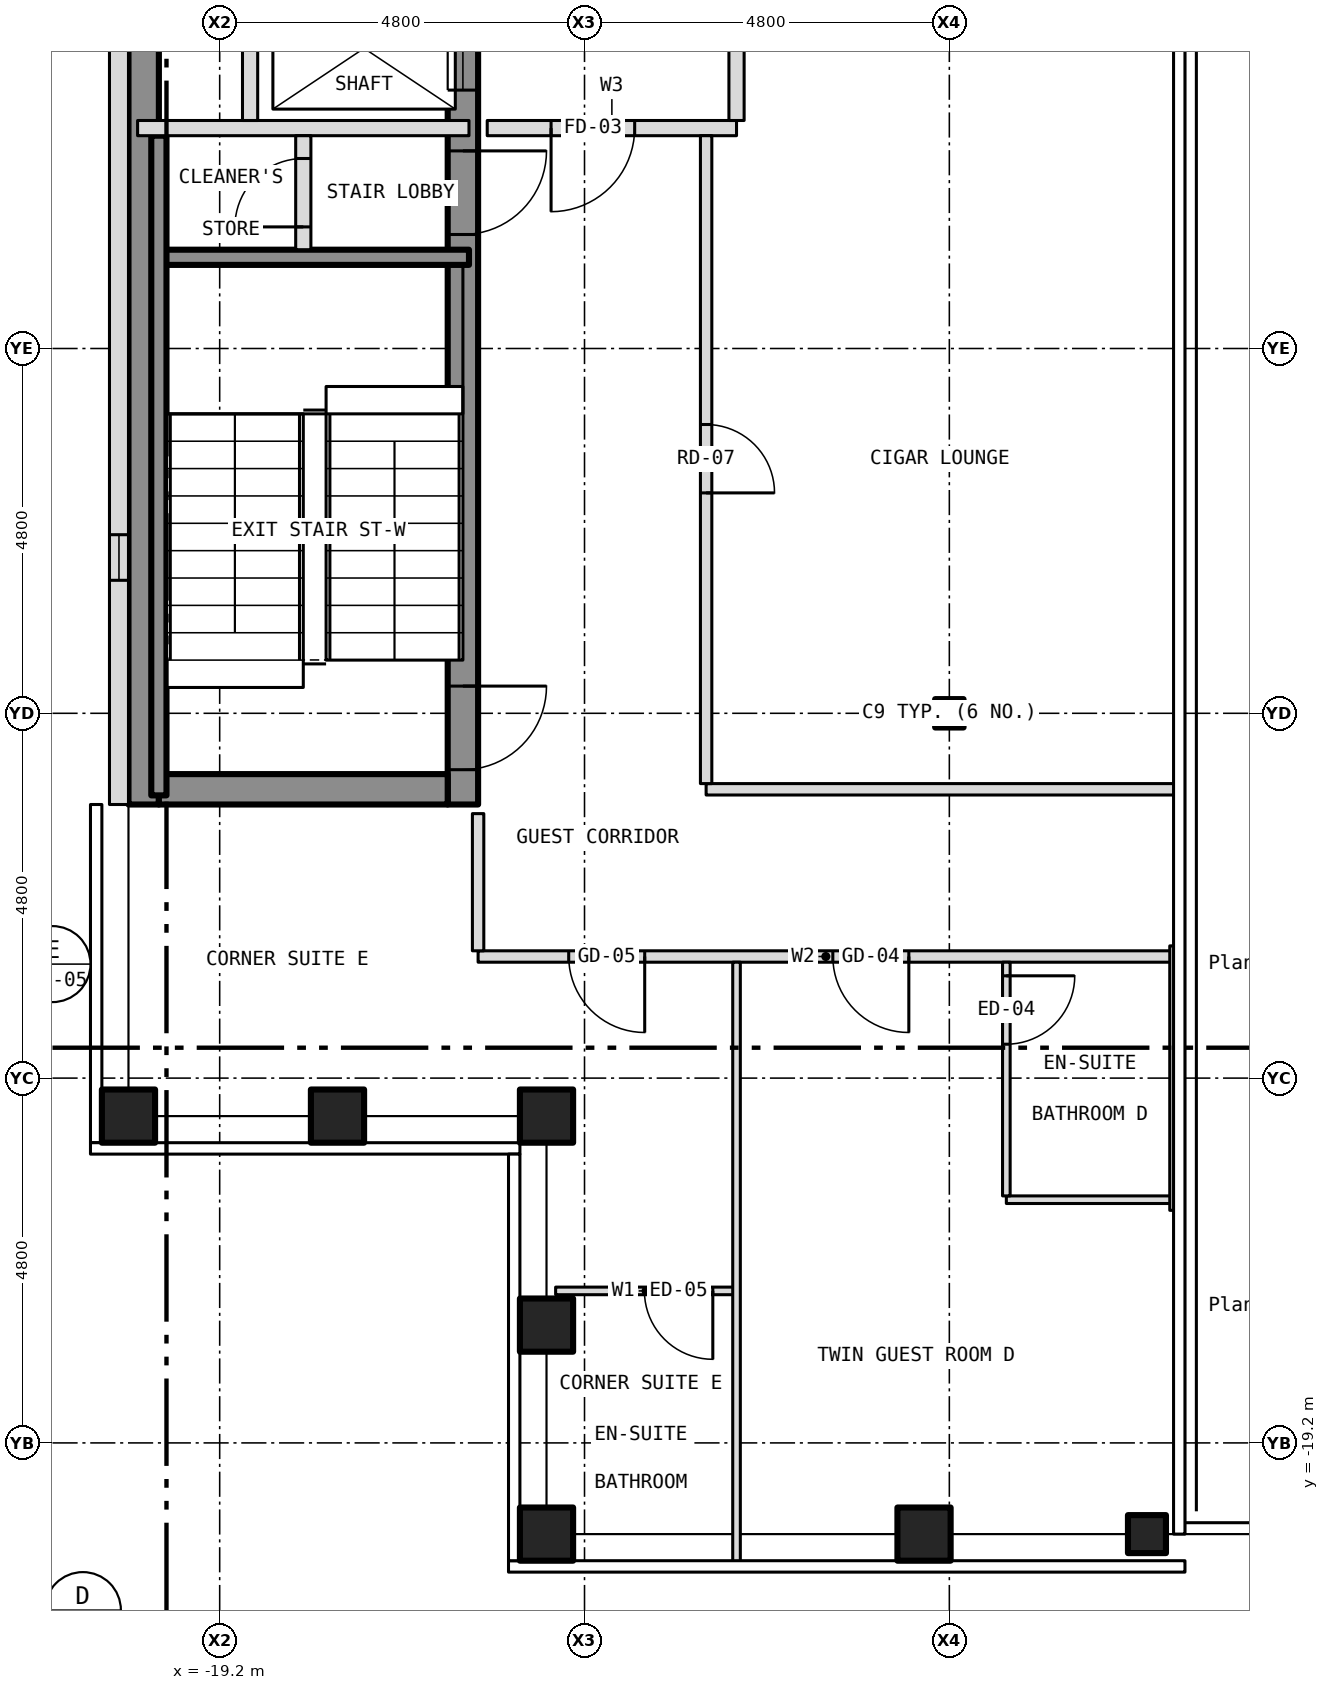
"""IFC4 building model, lengths in metres.
Left out: names, types, materials, properties, quantities, classifications, styles, units other than length and angle.
Written with IfcOpenShell. Run it as: python <this file> out.ifc"""

import sys

from ifc_helpers import new_model, si_unit, direction, frame, frame_2d, origin, origin_2d, place, context, subcontext, project, spatial, rectangle, hollow_rectangle, i_section, extrude, element, fill, save


model = new_model("IFC4")
c1 = context("Model", 3, precision=1e-05, world=origin(), true_north=direction((0.0, 1.0)))
c2 = subcontext(c1, "Body", "Model", "MODEL_VIEW")
j1 = project(units=[si_unit("LENGTHUNIT", "METRE"), si_unit("PLANEANGLEUNIT", "RADIAN")], contexts=[c1])
p1 = place(None, origin())
s1 = spatial("IfcSite", under=j1, at=p1, CompositionType="ELEMENT")
p2 = place(p1, origin())
s2 = spatial("IfcBuilding", under=s1, at=p2, CompositionType="ELEMENT")
p3 = place(p2, frame((0.0, 0.0, 219.0)))
s3 = spatial("IfcBuildingStorey", under=s2, at=p3, CompositionType="ELEMENT", Elevation=219.0)
for number, where, z_axis, x_axis in (
    (1, (-14.9, -20.4, -0.15), (0.0, 0.0, 1.0), (1.0, 0.0, 0.0)),
    (2, (-9.933, -20.4, -0.15), (0.0, 0.0, 1.0), (1.0, 0.0, 0.0)),
    (3, (-20.4, -14.9, -0.15), (0.0, 0.0, 1.0), (1.0, 0.0, 0.0)),
    (4, (-14.9, -14.9, -0.15), (0.0, 0.0, 1.0), (1.0, 0.0, 0.0)),
    (5, (-14.9, -17.65, -0.15), (0.0, 0.0, 1.0), (1.0, 0.0, 0.0)),
    (6, (-17.65, -14.9, -0.15), (0.0, 0.0, 1.0), (1.0, 0.0, 0.0)),
):
    element("IfcColumn", number, at=place(p3, frame(where, z_axis=z_axis, x_axis=x_axis)), inside=s3, PredefinedType="COLUMN", context=c2, shape_type="SweptSolid", body=[
        extrude(hollow_rectangle(XDim=0.7, YDim=0.7, WallThickness=0.04, at=origin_2d()), origin(), (0.0, 0.0, 1.0), 3.5),
    ])
p4 = place(p3, frame((-7.0, -20.4, -0.15), z_axis=(0.0, 0.0, 1.0), x_axis=(1.0, 0.0, 0.0)))
e7 = element("IfcColumn", 7, at=p4, inside=s3, PredefinedType="COLUMN", context=c2, shape_type="SweptSolid", body=[
    extrude(hollow_rectangle(XDim=0.5, YDim=0.5, WallThickness=0.03, at=origin_2d()), origin(), (0.0, 0.0, 1.0), 3.5),
])
p5 = place(p3, frame((-9.6, -9.6, -0.15), z_axis=(0.0, 0.0, 1.0), x_axis=(1.0, 0.0, 0.0)))
e8 = element("IfcColumn", 8, at=p5, inside=s3, PredefinedType="COLUMN", context=c2, shape_type="SweptSolid", body=[
    extrude(i_section(OverallWidth=0.373, OverallDepth=0.373, WebThickness=0.016, FlangeThickness=0.026, at=origin_2d()), origin(), (0.0, 0.0, 1.0), 3.5),
])
p6 = place(p3, frame((-16.0, -10.8, 0.0), z_axis=(0.0, 0.0, 1.0), x_axis=(0.0, 1.0, 0.0)))
e9 = element("IfcWall", 9, at=p6, inside=s3, PredefinedType="SHEAR", context=c2, shape_type="SweptSolid", body=[
    extrude(rectangle(XDim=21.6, YDim=0.4, at=frame_2d((10.8, 0.0))), origin(), (0.0, 0.0, 1.0), 3.25),
])
p7 = place(p6, frame((9.4, 0.0, 0.0)))
e10 = element("IfcOpeningElement", 10, at=p7, cuts=e9, PredefinedType="OPENING", context=c2, shape_type="SweptSolid", body=[
    extrude(rectangle(XDim=1.1, YDim=2.1, at=frame_2d((0.55, 1.05))), frame((0.0, 0.212, 0.0), z_axis=(0.0, -1.0, 0.0), x_axis=(1.0, 0.0, 0.0)), (0.0, 0.0, 1.0), 0.424),
])
p8 = place(p6, frame((11.5, 0.0, 0.0)))
e11 = element("IfcOpeningElement", 11, at=p8, cuts=e9, PredefinedType="OPENING", context=c2, shape_type="SweptSolid", body=[
    extrude(rectangle(XDim=1.1, YDim=2.1, at=frame_2d((0.55, 1.05))), frame((0.0, 0.212, 0.0), z_axis=(0.0, -1.0, 0.0), x_axis=(1.0, 0.0, 0.0)), (0.0, 0.0, 1.0), 0.424),
])
p9 = place(p6, frame((13.6, 0.0, 0.0)))
e12 = element("IfcOpeningElement", 12, at=p9, cuts=e9, PredefinedType="OPENING", context=c2, shape_type="SweptSolid", body=[
    extrude(rectangle(XDim=1.1, YDim=2.1, at=frame_2d((0.55, 1.05))), frame((0.0, 0.212, 0.0), z_axis=(0.0, -1.0, 0.0), x_axis=(1.0, 0.0, 0.0)), (0.0, 0.0, 1.0), 0.424),
])
p10 = place(p6, frame((15.7, 0.0, 0.0)))
e13 = element("IfcOpeningElement", 13, at=p10, cuts=e9, PredefinedType="OPENING", context=c2, shape_type="SweptSolid", body=[
    extrude(rectangle(XDim=1.1, YDim=2.1, at=frame_2d((0.55, 1.05))), frame((0.0, 0.212, 0.0), z_axis=(0.0, -1.0, 0.0), x_axis=(1.0, 0.0, 0.0)), (0.0, 0.0, 1.0), 0.424),
])
p11 = place(p6, frame((17.8, 0.0, 0.0)))
e14 = element("IfcOpeningElement", 14, at=p11, cuts=e9, PredefinedType="OPENING", context=c2, shape_type="SweptSolid", body=[
    extrude(rectangle(XDim=1.1, YDim=2.1, at=frame_2d((0.55, 1.05))), frame((0.0, 0.212, 0.0), z_axis=(0.0, -1.0, 0.0), x_axis=(1.0, 0.0, 0.0)), (0.0, 0.0, 1.0), 0.424),
])
p12 = place(p6, frame((0.458, 0.0, 0.0)))
e15 = element("IfcOpeningElement", 15, at=p12, cuts=e9, PredefinedType="OPENING", context=c2, shape_type="SweptSolid", body=[
    extrude(rectangle(XDim=1.1, YDim=2.1, at=frame_2d((0.55, 1.05))), frame((0.0, 0.212, 0.0), z_axis=(0.0, -1.0, 0.0), x_axis=(1.0, 0.0, 0.0)), (0.0, 0.0, 1.0), 0.424),
])
p13 = place(p6, frame((7.5, 0.0, 0.0)))
e16 = element("IfcOpeningElement", 16, at=p13, cuts=e9, PredefinedType="OPENING", context=c2, shape_type="SweptSolid", body=[
    extrude(rectangle(XDim=1.1, YDim=2.1, at=frame_2d((0.55, 1.05))), frame((0.0, 0.212, 0.0), z_axis=(0.0, -1.0, 0.0), x_axis=(1.0, 0.0, 0.0)), (0.0, 0.0, 1.0), 0.424),
])
p14 = place(p6, frame((20.0, 0.0, 0.0)))
e17 = element("IfcOpeningElement", 17, at=p14, cuts=e9, PredefinedType="OPENING", context=c2, shape_type="SweptSolid", body=[
    extrude(rectangle(XDim=0.9, YDim=2.1, at=frame_2d((0.45, 1.05))), frame((0.0, 0.212, 0.0), z_axis=(0.0, -1.0, 0.0), x_axis=(1.0, 0.0, 0.0)), (0.0, 0.0, 1.0), 0.424),
])
p15 = place(p3, frame((-20.2, -10.8, 0.0), z_axis=(0.0, 0.0, 1.0), x_axis=(0.0, 1.0, 0.0)))
e18 = element("IfcWall", 18, at=p15, inside=s3, PredefinedType="SHEAR", context=c2, shape_type="SweptSolid", body=[
    extrude(rectangle(XDim=21.6, YDim=0.4, at=frame_2d((10.8, 0.0))), origin(), (0.0, 0.0, 1.0), 3.25),
])
p16 = place(p3, frame((-20.0, -10.6, 0.0), z_axis=(0.0, 0.0, 1.0), x_axis=(1.0, 0.0, 0.0)))
e19 = element("IfcWall", 19, at=p16, inside=s3, PredefinedType="SHEAR", context=c2, shape_type="SweptSolid", body=[
    extrude(rectangle(XDim=3.8, YDim=0.4, at=frame_2d((1.9, 0.0))), origin(), (0.0, 0.0, 1.0), 3.25),
])
p17 = place(p3, frame((-20.525, 10.8, 0.0), z_axis=(0.0, 0.0, 1.0), x_axis=(0.0, -1.0, 0.0)))
e20 = element("IfcWall", 20, at=p17, inside=s3, PredefinedType="SOLIDWALL", context=c2, shape_type="SweptSolid", body=[
    extrude(rectangle(XDim=21.6, YDim=0.25, at=frame_2d((10.8, 0.0))), origin(), (0.0, 0.0, 1.0), 3.5),
])
p18 = place(p17, frame((18.05, 0.0, 1.0)))
e21 = element("IfcOpeningElement", 21, at=p18, cuts=e20, PredefinedType="OPENING", context=c2, shape_type="SweptSolid", body=[
    extrude(rectangle(XDim=0.6, YDim=1.5, at=frame_2d((0.3, 0.75))), frame((0.0, 0.137, 0.0), z_axis=(0.0, -1.0, 0.0), x_axis=(1.0, 0.0, 0.0)), (0.0, 0.0, 1.0), 0.274),
])
p19 = place(p3, frame((-14.78, -17.2, 0.0), z_axis=(0.0, 0.0, 1.0), x_axis=(1.0, 0.0, 0.0)))
e22 = element("IfcWall", 22, at=p19, inside=s3, PredefinedType="PARTITIONING", context=c2, shape_type="SweptSolid", body=[
    extrude(rectangle(XDim=2.38, YDim=0.1, at=frame_2d((1.19, 0.0))), origin(), (0.0, 0.0, 1.0), 3.35),
])
p20 = place(p19, frame((1.168, 0.0, 0.0)))
e23 = element("IfcOpeningElement", 23, at=p20, cuts=e22, PredefinedType="OPENING", context=c2, shape_type="SweptSolid", body=[
    extrude(rectangle(XDim=0.9, YDim=2.1, at=frame_2d((0.45, 1.05))), frame((0.0, 0.062, 0.0), z_axis=(0.0, -1.0, 0.0), x_axis=(1.0, 0.0, 0.0)), (0.0, 0.0, 1.0), 0.124),
])
p21 = place(p3, frame((-8.85, -16.0, 0.0), z_axis=(0.0, 0.0, 1.0), x_axis=(1.0, 0.0, 0.0)))
e24 = element("IfcWall", 24, at=p21, inside=s3, PredefinedType="PARTITIONING", context=c2, shape_type="SweptSolid", body=[
    extrude(rectangle(XDim=2.2, YDim=0.1, at=frame_2d((1.1, 0.0))), origin(), (0.0, 0.0, 1.0), 3.35),
])
p22 = place(p3, frame((-15.8, -12.8, 0.0), z_axis=(0.0, 0.0, 1.0), x_axis=(1.0, 0.0, 0.0)))
e25 = element("IfcWall", 25, at=p22, inside=s3, PredefinedType="PARTITIONING", context=c2, shape_type="SweptSolid", body=[
    extrude(rectangle(XDim=9.15, YDim=0.15, at=frame_2d((4.575, 0.0))), origin(), (0.0, 0.0, 1.0), 3.35),
])
p23 = place(p22, frame((4.667, 0.0, 0.0)))
e26 = element("IfcOpeningElement", 26, at=p23, cuts=e25, PredefinedType="OPENING", context=c2, shape_type="SweptSolid", body=[
    extrude(rectangle(XDim=1.0, YDim=2.1, at=frame_2d((0.5, 1.05))), frame((0.0, 0.087, 0.0), z_axis=(0.0, -1.0, 0.0), x_axis=(1.0, 0.0, 0.0)), (0.0, 0.0, 1.0), 0.174),
])
p24 = place(p22, frame((1.192, 0.0, 0.0)))
e27 = element("IfcOpeningElement", 27, at=p24, cuts=e25, PredefinedType="OPENING", context=c2, shape_type="SweptSolid", body=[
    extrude(rectangle(XDim=1.0, YDim=2.1, at=frame_2d((0.5, 1.05))), frame((0.0, 0.087, 0.0), z_axis=(0.0, -1.0, 0.0), x_axis=(1.0, 0.0, 0.0)), (0.0, 0.0, 1.0), 0.174),
])
p25 = place(p3, frame((-12.8, -10.6, 0.0), z_axis=(0.0, 0.0, 1.0), x_axis=(1.0, 0.0, 0.0)))
e28 = element("IfcWall", 28, at=p25, inside=s3, PredefinedType="PARTITIONING", context=c2, shape_type="SweptSolid", body=[
    extrude(rectangle(XDim=6.18, YDim=0.15, at=frame_2d((3.09, 0.0))), origin(), (0.0, 0.0, 1.0), 3.35),
])
p26 = place(p3, frame((-20.0, -3.6, 0.0), z_axis=(0.0, 0.0, 1.0), x_axis=(1.0, 0.0, 0.0)))
e29 = element("IfcWall", 29, at=p26, inside=s3, PredefinedType="SHEAR", context=c2, shape_type="SweptSolid", body=[
    extrude(rectangle(XDim=4.08, YDim=0.2, at=frame_2d((2.04, 0.0))), origin(), (0.0, 0.0, 1.0), 3.25),
])
p27 = place(p3, frame((-20.28, -1.9, 0.0), z_axis=(0.0, 0.0, 1.0), x_axis=(1.0, 0.0, 0.0)))
e30 = element("IfcWall", 30, at=p27, inside=s3, PredefinedType="PARTITIONING", context=c2, shape_type="SweptSolid", body=[
    extrude(rectangle(XDim=4.36, YDim=0.2, at=frame_2d((2.18, 0.0))), origin(), (0.0, 0.0, 1.0), 3.25),
])
p28 = place(p3, frame((-15.68, -1.9, 0.0), z_axis=(0.0, 0.0, 1.0), x_axis=(1.0, 0.0, 0.0)))
e31 = element("IfcWall", 31, at=p28, inside=s3, PredefinedType="PARTITIONING", context=c2, shape_type="SweptSolid", body=[
    extrude(rectangle(XDim=3.28, YDim=0.2, at=frame_2d((1.64, 0.0))), origin(), (0.0, 0.0, 1.0), 3.35),
])
p29 = place(p28, frame((0.84, 0.0, 0.0)))
e32 = element("IfcOpeningElement", 32, at=p29, cuts=e31, PredefinedType="OPENING", context=c2, shape_type="SweptSolid", body=[
    extrude(rectangle(XDim=1.1, YDim=2.1, at=frame_2d((0.55, 1.05))), frame((0.0, 0.112, 0.0), z_axis=(0.0, -1.0, 0.0), x_axis=(1.0, 0.0, 0.0)), (0.0, 0.0, 1.0), 0.224),
])
p30 = place(p3, frame((-20.0, -10.68, 0.0), z_axis=(0.0, 0.0, 1.0), x_axis=(0.0, 1.0, 0.0)))
e33 = element("IfcWall", 33, at=p30, inside=s3, PredefinedType="SHEAR", context=c2, shape_type="SweptSolid", body=[
    extrude(rectangle(XDim=8.68, YDim=0.2, at=frame_2d((4.34, 0.0))), origin(), (0.0, 0.0, 1.0), 3.25),
])
p31 = place(p3, frame((-18.8, -1.8, 0.0), z_axis=(0.0, 0.0, 1.0), x_axis=(0.0, 1.0, 0.0)))
e34 = element("IfcWall", 34, at=p31, inside=s3, PredefinedType="PARTITIONING", context=c2, shape_type="SweptSolid", body=[
    extrude(rectangle(XDim=12.48, YDim=0.2, at=frame_2d((6.24, 0.0))), origin(), (0.0, 0.0, 1.0), 3.25),
])
p32 = place(p3, frame((-18.1, -3.5, 0.0), z_axis=(0.0, 0.0, 1.0), x_axis=(0.0, 1.0, 0.0)))
e35 = element("IfcWall", 35, at=p32, inside=s3, PredefinedType="PARTITIONING", context=c2, shape_type="SweptSolid", body=[
    extrude(rectangle(XDim=1.5, YDim=0.2, at=frame_2d((0.75, 0.0))), origin(), (0.0, 0.0, 1.0), 3.25),
])
p33 = place(p32, frame((0.3, 0.0, 0.0)))
e36 = element("IfcOpeningElement", 36, at=p33, cuts=e35, PredefinedType="OPENING", context=c2, shape_type="SweptSolid", body=[
    extrude(rectangle(XDim=0.9, YDim=2.1, at=frame_2d((0.45, 1.05))), frame((0.0, 0.112, 0.0), z_axis=(0.0, -1.0, 0.0), x_axis=(1.0, 0.0, 0.0)), (0.0, 0.0, 1.0), 0.224),
])
p34 = place(p3, frame((-15.8, -12.725, 0.0), z_axis=(0.0, 0.0, 1.0), x_axis=(0.0, 1.0, 0.0)))
e37 = element("IfcWall", 37, at=p34, inside=s3, PredefinedType="PARTITIONING", context=c2, shape_type="SweptSolid", body=[
    extrude(rectangle(XDim=1.805, YDim=0.15, at=frame_2d((0.903, 0.0))), origin(), (0.0, 0.0, 1.0), 3.35),
])
p35 = place(p3, frame((-12.8, -10.525, 0.0), z_axis=(0.0, 0.0, 1.0), x_axis=(0.0, 1.0, 0.0)))
e38 = element("IfcWall", 38, at=p35, inside=s3, PredefinedType="PARTITIONING", context=c2, shape_type="SweptSolid", body=[
    extrude(rectangle(XDim=8.525, YDim=0.15, at=frame_2d((4.262, 0.0))), origin(), (0.0, 0.0, 1.0), 3.35),
])
p36 = place(p35, frame((3.825, 0.0, 0.0)))
e39 = element("IfcOpeningElement", 39, at=p36, cuts=e38, PredefinedType="OPENING", context=c2, shape_type="SweptSolid", body=[
    extrude(rectangle(XDim=0.9, YDim=2.1, at=frame_2d((0.45, 1.05))), frame((0.0, 0.087, 0.0), z_axis=(0.0, -1.0, 0.0), x_axis=(1.0, 0.0, 0.0)), (0.0, 0.0, 1.0), 0.174),
])
p37 = place(p3, frame((-12.4, -20.78, 0.0), z_axis=(0.0, 0.0, 1.0), x_axis=(0.0, 1.0, 0.0)))
e40 = element("IfcWall", 40, at=p37, inside=s3, PredefinedType="PARTITIONING", context=c2, shape_type="SweptSolid", body=[
    extrude(rectangle(XDim=7.905, YDim=0.1, at=frame_2d((3.953, 0.0))), origin(), (0.0, 0.0, 1.0), 3.35),
])
p38 = place(p3, frame((-12.4, -1.8, 0.0), z_axis=(0.0, 0.0, 1.0), x_axis=(0.0, 1.0, 0.0)))
e41 = element("IfcWall", 41, at=p38, inside=s3, PredefinedType="PARTITIONING", context=c2, shape_type="SweptSolid", body=[
    extrude(rectangle(XDim=4.0, YDim=0.2, at=frame_2d((2.0, 0.0))), origin(), (0.0, 0.0, 1.0), 3.35),
])
p39 = place(p3, frame((-8.85, -15.95, 0.0), z_axis=(0.0, 0.0, 1.0), x_axis=(0.0, 1.0, 0.0)))
e42 = element("IfcWall", 42, at=p39, inside=s3, PredefinedType="PARTITIONING", context=c2, shape_type="SweptSolid", body=[
    extrude(rectangle(XDim=3.075, YDim=0.1, at=frame_2d((1.538, 0.0))), origin(), (0.0, 0.0, 1.0), 3.35),
])
p40 = place(p39, frame((1.996, 0.0, 0.0)))
e43 = element("IfcOpeningElement", 43, at=p40, cuts=e42, PredefinedType="OPENING", context=c2, shape_type="SweptSolid", body=[
    extrude(rectangle(XDim=0.9, YDim=2.1, at=frame_2d((0.45, 1.05))), frame((0.0, 0.062, 0.0), z_axis=(0.0, -1.0, 0.0), x_axis=(1.0, 0.0, 0.0)), (0.0, 0.0, 1.0), 0.124),
])
p41 = place(p3, frame((-6.65, -16.14, 0.0), z_axis=(0.0, 0.0, 1.0), x_axis=(0.0, 1.0, 0.0)))
e44 = element("IfcWall", 44, at=p41, inside=s3, PredefinedType="PARTITIONING", context=c2, shape_type="SweptSolid", body=[
    extrude(rectangle(XDim=3.48, YDim=0.1, at=frame_2d((1.74, 0.0))), origin(), (0.0, 0.0, 1.0), 3.35),
])
p42 = place(p18, origin())
e45 = element("IfcWindow", 45, at=p42, inside=s3, PartitioningType="SINGLE_PANEL", PredefinedType="WINDOW", context=c2, shape_type="SweptSolid", body=[
    extrude(rectangle(XDim=0.6, YDim=1.5, at=frame_2d((0.3, 0.75))), frame((0.0, -0.035, 0.0), z_axis=(0.0, -1.0, 0.0), x_axis=(1.0, 0.0, 0.0)), (0.0, 0.0, 1.0), 0.06),
])
fill(e21, e45)
p43 = place(p7, origin())
e46 = element("IfcDoor", 46, at=p43, inside=s3, OperationType="SLIDING_TO_LEFT", PredefinedType="DOOR", context=c2, shape_type="SweptSolid", body=[
    extrude(rectangle(XDim=1.1, YDim=2.1, at=frame_2d((0.55, 1.05))), frame((0.0, 0.025, 0.0), z_axis=(0.0, -1.0, 0.0), x_axis=(1.0, 0.0, 0.0)), (0.0, 0.0, 1.0), 0.05),
])
fill(e10, e46)
p44 = place(p12, origin())
e47 = element("IfcDoor", 47, at=p44, inside=s3, OperationType="SINGLE_SWING_RIGHT", PredefinedType="DOOR", context=c2, shape_type="SweptSolid", body=[
    extrude(rectangle(XDim=1.1, YDim=2.1, at=frame_2d((0.55, 1.05))), frame((0.0, 0.025, 0.0), z_axis=(0.0, -1.0, 0.0), x_axis=(1.0, 0.0, 0.0)), (0.0, 0.0, 1.0), 0.05),
])
fill(e15, e47)
p45 = place(p33, origin())
e48 = element("IfcDoor", 48, at=p45, inside=s3, OperationType="SINGLE_SWING_LEFT", PredefinedType="DOOR", context=c2, shape_type="SweptSolid", body=[
    extrude(rectangle(XDim=0.9, YDim=2.1, at=frame_2d((0.45, 1.05))), frame((0.0, 0.025, 0.0), z_axis=(0.0, -1.0, 0.0), x_axis=(1.0, 0.0, 0.0)), (0.0, 0.0, 1.0), 0.05),
])
fill(e36, e48)
p46 = place(p13, origin())
e49 = element("IfcDoor", 49, at=p46, inside=s3, OperationType="SINGLE_SWING_RIGHT", PredefinedType="DOOR", context=c2, shape_type="SweptSolid", body=[
    extrude(rectangle(XDim=1.1, YDim=2.1, at=frame_2d((0.55, 1.05))), frame((0.0, 0.025, 0.0), z_axis=(0.0, -1.0, 0.0), x_axis=(1.0, 0.0, 0.0)), (0.0, 0.0, 1.0), 0.05),
])
fill(e16, e49)
p47 = place(p29, origin())
e50 = element("IfcDoor", 50, at=p47, inside=s3, OperationType="SINGLE_SWING_LEFT", PredefinedType="DOOR", context=c2, shape_type="SweptSolid", body=[
    extrude(rectangle(XDim=1.1, YDim=2.1, at=frame_2d((0.55, 1.05))), frame((0.0, 0.025, 0.0), z_axis=(0.0, -1.0, 0.0), x_axis=(1.0, 0.0, 0.0)), (0.0, 0.0, 1.0), 0.05),
])
fill(e32, e50)
p48 = place(p23, origin())
e51 = element("IfcDoor", 51, at=p48, inside=s3, OperationType="SINGLE_SWING_RIGHT", PredefinedType="DOOR", context=c2, shape_type="SweptSolid", body=[
    extrude(rectangle(XDim=1.0, YDim=2.1, at=frame_2d((0.5, 1.05))), frame((0.0, 0.025, 0.0), z_axis=(0.0, -1.0, 0.0), x_axis=(1.0, 0.0, 0.0)), (0.0, 0.0, 1.0), 0.05),
])
fill(e26, e51)
p49 = place(p40, origin())
e52 = element("IfcDoor", 52, at=p49, inside=s3, OperationType="SINGLE_SWING_RIGHT", PredefinedType="DOOR", context=c2, shape_type="SweptSolid", body=[
    extrude(rectangle(XDim=0.9, YDim=2.1, at=frame_2d((0.45, 1.05))), frame((0.0, 0.025, 0.0), z_axis=(0.0, -1.0, 0.0), x_axis=(1.0, 0.0, 0.0)), (0.0, 0.0, 1.0), 0.05),
])
fill(e43, e52)
p50 = place(p20, origin())
e53 = element("IfcDoor", 53, at=p50, inside=s3, OperationType="SINGLE_SWING_RIGHT", PredefinedType="DOOR", context=c2, shape_type="SweptSolid", body=[
    extrude(rectangle(XDim=0.9, YDim=2.1, at=frame_2d((0.45, 1.05))), frame((0.0, 0.025, 0.0), z_axis=(0.0, -1.0, 0.0), x_axis=(1.0, 0.0, 0.0)), (0.0, 0.0, 1.0), 0.05),
])
fill(e23, e53)
p51 = place(p24, origin())
e54 = element("IfcDoor", 54, at=p51, inside=s3, OperationType="SINGLE_SWING_RIGHT", PredefinedType="DOOR", context=c2, shape_type="SweptSolid", body=[
    extrude(rectangle(XDim=1.0, YDim=2.1, at=frame_2d((0.5, 1.05))), frame((0.0, 0.025, 0.0), z_axis=(0.0, -1.0, 0.0), x_axis=(1.0, 0.0, 0.0)), (0.0, 0.0, 1.0), 0.05),
])
fill(e27, e54)
p52 = place(p36, origin())
e55 = element("IfcDoor", 55, at=p52, inside=s3, OperationType="SINGLE_SWING_LEFT", PredefinedType="DOOR", context=c2, shape_type="SweptSolid", body=[
    extrude(rectangle(XDim=0.9, YDim=2.1, at=frame_2d((0.45, 1.05))), frame((0.0, 0.025, 0.0), z_axis=(0.0, -1.0, 0.0), x_axis=(1.0, 0.0, 0.0)), (0.0, 0.0, 1.0), 0.05),
])
fill(e39, e55)
save(model, sys.argv[1])
